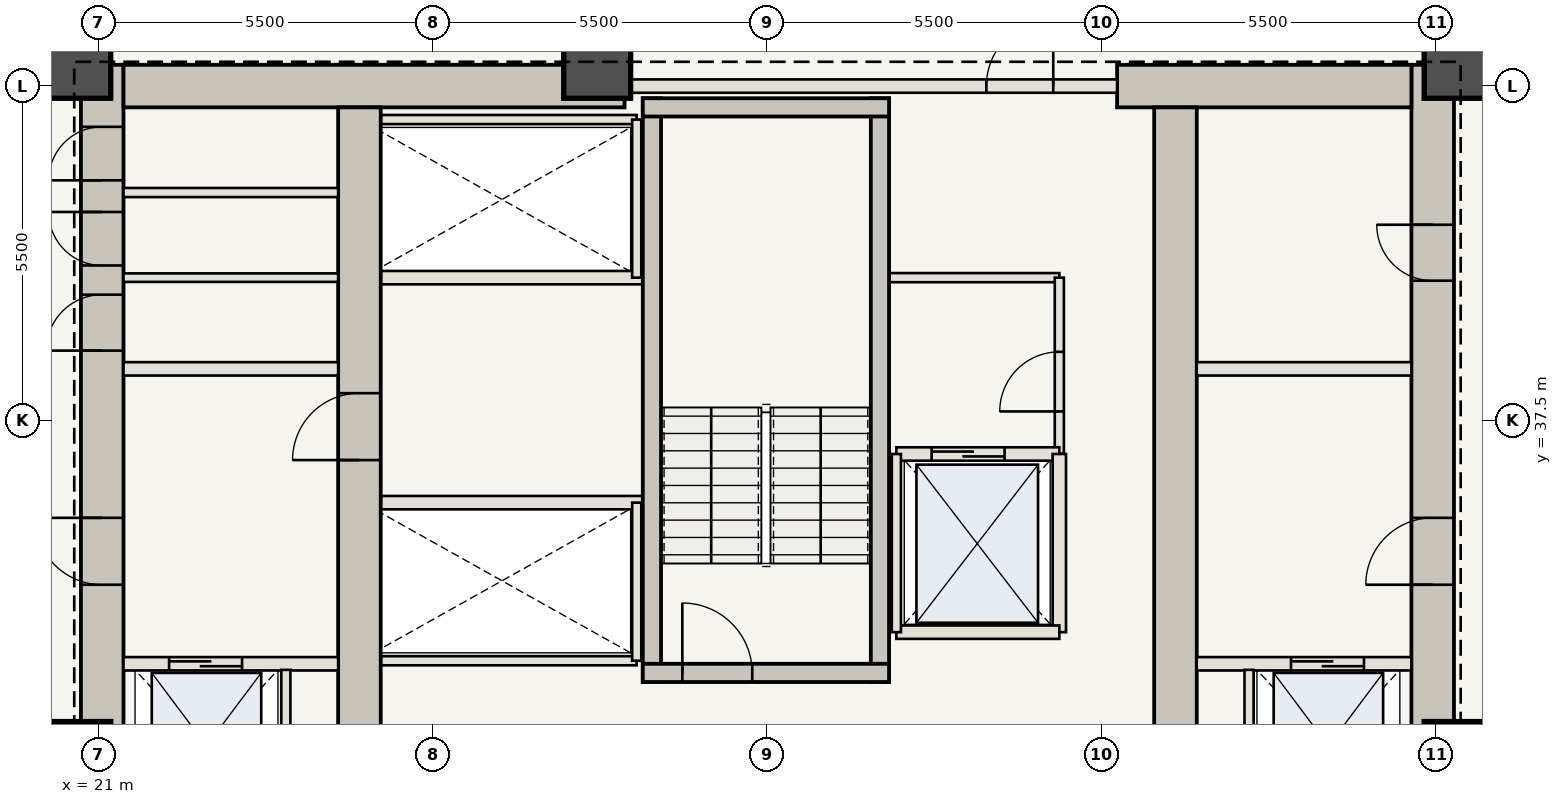
"""IFC4 building model, lengths in metres.
Left out: names, types, materials, properties, quantities, classifications, styles, units other than length and angle.
Written with IfcOpenShell. Run it as: python <this file> out.ifc"""

import sys

from ifc_helpers import new_model, si_unit, direction, frame, frame_2d, origin, origin_2d, place, context, subcontext, project, spatial, rectangle, extrude, element, fill, save


model = new_model("IFC4")
c1 = context("Model", 3, precision=1e-05, world=origin(), true_north=direction((0.0, 1.0)))
c2 = subcontext(c1, "Body", "Model", "MODEL_VIEW")
j1 = project(units=[si_unit("LENGTHUNIT", "METRE"), si_unit("PLANEANGLEUNIT", "RADIAN")], contexts=[c1])
p1 = place(None, origin())
s1 = spatial("IfcSite", under=j1, at=p1, CompositionType="ELEMENT")
p2 = place(p1, origin())
s2 = spatial("IfcBuilding", under=s1, at=p2, CompositionType="ELEMENT")
p3 = place(p2, frame((0.0, 0.0, 92.75)))
s3 = spatial("IfcBuildingStorey", under=s2, at=p3, CompositionType="ELEMENT", Elevation=92.75)
p4 = place(p3, frame((21.06, 30.6, 0.0), z_axis=(0.0, 0.0, 1.0), x_axis=(0.0, 1.0, 0.0)))
e1 = element("IfcWall", 1, at=p4, inside=s3, PredefinedType="SHEAR", context=c2, shape_type="SweptSolid", body=[
    extrude(rectangle(XDim=12.75, YDim=0.7, at=frame_2d((6.375, 0.0))), origin(), (0.0, 0.0, 1.0), 3.5),
])
p5 = place(p4, frame((4.2, 0.0, 0.0)))
e2 = element("IfcOpeningElement", 2, at=p5, cuts=e1, PredefinedType="OPENING", context=c2, shape_type="SweptSolid", body=[
    extrude(rectangle(XDim=1.1, YDim=2.15, at=frame_2d((0.55, 1.075))), frame((0.0, 0.36, 0.0), z_axis=(0.0, -1.0, 0.0), x_axis=(1.0, 0.0, 0.0)), (0.0, 0.0, 1.0), 0.72),
])
p6 = place(p4, frame((8.05, 0.0, 0.0)))
e3 = element("IfcOpeningElement", 3, at=p6, cuts=e1, PredefinedType="OPENING", context=c2, shape_type="SweptSolid", body=[
    extrude(rectangle(XDim=0.92, YDim=2.1, at=frame_2d((0.46, 1.05))), frame((0.0, 0.36, 0.0), z_axis=(0.0, -1.0, 0.0), x_axis=(1.0, 0.0, 0.0)), (0.0, 0.0, 1.0), 0.72),
])
p7 = place(p4, frame((9.45, 0.0, 0.0)))
e4 = element("IfcOpeningElement", 4, at=p7, cuts=e1, PredefinedType="OPENING", context=c2, shape_type="SweptSolid", body=[
    extrude(rectangle(XDim=0.88, YDim=2.1, at=frame_2d((0.44, 1.05))), frame((0.0, 0.36, 0.0), z_axis=(0.0, -1.0, 0.0), x_axis=(1.0, 0.0, 0.0)), (0.0, 0.0, 1.0), 0.72),
])
p8 = place(p4, frame((10.85, 0.0, 0.0)))
e5 = element("IfcOpeningElement", 5, at=p8, cuts=e1, PredefinedType="OPENING", context=c2, shape_type="SweptSolid", body=[
    extrude(rectangle(XDim=0.88, YDim=2.1, at=frame_2d((0.44, 1.05))), frame((0.0, 0.36, 0.0), z_axis=(0.0, -1.0, 0.0), x_axis=(1.0, 0.0, 0.0)), (0.0, 0.0, 1.0), 0.72),
])
p9 = place(p3, frame((42.94, 30.6, 0.0), z_axis=(0.0, 0.0, 1.0), x_axis=(0.0, 1.0, 0.0)))
e6 = element("IfcWall", 6, at=p9, inside=s3, PredefinedType="SHEAR", context=c2, shape_type="SweptSolid", body=[
    extrude(rectangle(XDim=12.75, YDim=0.7, at=frame_2d((6.375, 0.0))), origin(), (0.0, 0.0, 1.0), 3.5),
])
p10 = place(p9, frame((4.2, 0.0, 0.0)))
e7 = element("IfcOpeningElement", 7, at=p10, cuts=e6, PredefinedType="OPENING", context=c2, shape_type="SweptSolid", body=[
    extrude(rectangle(XDim=1.1, YDim=2.15, at=frame_2d((0.55, 1.075))), frame((0.0, 0.36, 0.0), z_axis=(0.0, -1.0, 0.0), x_axis=(1.0, 0.0, 0.0)), (0.0, 0.0, 1.0), 0.72),
])
p11 = place(p9, frame((9.2, 0.0, 0.0)))
e8 = element("IfcOpeningElement", 8, at=p11, cuts=e6, PredefinedType="OPENING", context=c2, shape_type="SweptSolid", body=[
    extrude(rectangle(XDim=0.92, YDim=2.1, at=frame_2d((0.46, 1.05))), frame((0.0, 0.36, 0.0), z_axis=(0.0, -1.0, 0.0), x_axis=(1.0, 0.0, 0.0)), (0.0, 0.0, 1.0), 0.72),
])
p12 = place(p3, frame((21.41, 43.0, 0.0), z_axis=(0.0, 0.0, 1.0), x_axis=(1.0, 0.0, 0.0)))
e9 = element("IfcWall", 9, at=p12, inside=s3, PredefinedType="SHEAR", context=c2, shape_type="SweptSolid", body=[
    extrude(rectangle(XDim=8.24, YDim=0.7, at=frame_2d((4.12, 0.0))), origin(), (0.0, 0.0, 1.0), 3.5),
])
p13 = place(p3, frame((37.75, 43.0, 0.0), z_axis=(0.0, 0.0, 1.0), x_axis=(1.0, 0.0, 0.0)))
e10 = element("IfcWall", 10, at=p13, inside=s3, PredefinedType="SHEAR", context=c2, shape_type="SweptSolid", body=[
    extrude(rectangle(XDim=4.84, YDim=0.7, at=frame_2d((2.42, 0.0))), origin(), (0.0, 0.0, 1.0), 3.5),
])
p14 = place(p3, frame((25.29, 30.6, 0.0), z_axis=(0.0, 0.0, 1.0), x_axis=(0.0, 1.0, 0.0)))
e11 = element("IfcWall", 11, at=p14, inside=s3, PredefinedType="SHEAR", context=c2, shape_type="SweptSolid", body=[
    extrude(rectangle(XDim=12.05, YDim=0.7, at=frame_2d((6.025, 0.0))), origin(), (0.0, 0.0, 1.0), 3.5),
])
p15 = place(p14, frame((6.25, 0.0, 0.0)))
e12 = element("IfcOpeningElement", 12, at=p15, cuts=e11, PredefinedType="OPENING", context=c2, shape_type="SweptSolid", body=[
    extrude(rectangle(XDim=1.1, YDim=2.15, at=frame_2d((0.55, 1.075))), frame((0.0, 0.36, 0.0), z_axis=(0.0, -1.0, 0.0), x_axis=(1.0, 0.0, 0.0)), (0.0, 0.0, 1.0), 0.72),
])
p16 = place(p3, frame((38.71, 30.6, 0.0), z_axis=(0.0, 0.0, 1.0), x_axis=(0.0, 1.0, 0.0)))
e13 = element("IfcWall", 13, at=p16, inside=s3, PredefinedType="SHEAR", context=c2, shape_type="SweptSolid", body=[
    extrude(rectangle(XDim=12.05, YDim=0.7, at=frame_2d((6.025, 0.0))), origin(), (0.0, 0.0, 1.0), 3.5),
])
for number, where, z_axis, x_axis in (
    (14, (43.35, 32.0, 0.0), (0.0, 0.0, 1.0), (1.0, 0.0, 0.0)),
    (15, (43.35, 43.35, 0.0), (0.0, 0.0, 1.0), (1.0, 0.0, 0.0)),
    (16, (29.2, 43.35, 0.0), (0.0, 0.0, 1.0), (1.0, 0.0, 0.0)),
    (17, (20.65, 43.35, 0.0), (0.0, 0.0, 1.0), (1.0, 0.0, 0.0)),
    (18, (20.65, 32.0, 0.0), (0.0, 0.0, 1.0), (1.0, 0.0, 0.0)),
):
    element("IfcColumn", number, at=place(p3, frame(where, z_axis=z_axis, x_axis=x_axis)), inside=s3, PredefinedType="COLUMN", context=c2, shape_type="SweptSolid", body=[
        extrude(rectangle(XDim=1.1, YDim=1.1, at=origin_2d()), origin(), (0.0, 0.0, 1.0), 3.5),
    ])
p17 = place(p3, frame((21.41, 33.5, 0.0), z_axis=(0.0, 0.0, 1.0), x_axis=(1.0, 0.0, 0.0)))
e19 = element("IfcWall", 19, at=p17, inside=s3, PredefinedType="STANDARD", context=c2, shape_type="SweptSolid", body=[
    extrude(rectangle(XDim=3.53, YDim=0.22, at=frame_2d((1.765, 0.0))), origin(), (0.0, 0.0, 1.0), 3.28),
])
p18 = place(p17, frame((0.75, 0.0, 0.0)))
e20 = element("IfcOpeningElement", 20, at=p18, cuts=e19, PredefinedType="OPENING", context=c2, shape_type="SweptSolid", body=[
    extrude(rectangle(XDim=1.2, YDim=2.2, at=frame_2d((0.6, 1.1))), frame((0.0, 0.12, 0.0), z_axis=(0.0, -1.0, 0.0), x_axis=(1.0, 0.0, 0.0)), (0.0, 0.0, 1.0), 0.24),
])
p19 = place(p3, frame((24.08, 30.75, 0.0), z_axis=(0.0, 0.0, 1.0), x_axis=(0.0, 1.0, 0.0)))
e21 = element("IfcWall", 21, at=p19, inside=s3, PredefinedType="STANDARD", context=c2, shape_type="SweptSolid", body=[
    extrude(rectangle(XDim=2.65, YDim=0.15, at=frame_2d((1.325, 0.0))), origin(), (0.0, 0.0, 1.0), 3.28),
])
p20 = place(p3, frame((39.06, 33.5, 0.0), z_axis=(0.0, 0.0, 1.0), x_axis=(1.0, 0.0, 0.0)))
e22 = element("IfcWall", 22, at=p20, inside=s3, PredefinedType="STANDARD", context=c2, shape_type="SweptSolid", body=[
    extrude(rectangle(XDim=3.53, YDim=0.22, at=frame_2d((1.765, 0.0))), origin(), (0.0, 0.0, 1.0), 3.28),
])
p21 = place(p20, frame((1.55, 0.0, 0.0)))
e23 = element("IfcOpeningElement", 23, at=p21, cuts=e22, PredefinedType="OPENING", context=c2, shape_type="SweptSolid", body=[
    extrude(rectangle(XDim=1.2, YDim=2.2, at=frame_2d((0.6, 1.1))), frame((0.0, 0.12, 0.0), z_axis=(0.0, -1.0, 0.0), x_axis=(1.0, 0.0, 0.0)), (0.0, 0.0, 1.0), 0.24),
])
p22 = place(p3, frame((39.92, 30.75, 0.0), z_axis=(0.0, 0.0, 1.0), x_axis=(0.0, 1.0, 0.0)))
e24 = element("IfcWall", 24, at=p22, inside=s3, PredefinedType="STANDARD", context=c2, shape_type="SweptSolid", body=[
    extrude(rectangle(XDim=2.65, YDim=0.15, at=frame_2d((1.325, 0.0))), origin(), (0.0, 0.0, 1.0), 3.28),
])
for number, where, z_axis, x_axis in (
    (25, (21.41, 38.35, 0.0), (0.0, 0.0, 1.0), (1.0, 0.0, 0.0)),
    (26, (39.06, 38.35, 0.0), (0.0, 0.0, 1.0), (1.0, 0.0, 0.0)),
):
    element("IfcWall", number, at=place(p3, frame(where, z_axis=z_axis, x_axis=x_axis)), inside=s3, PredefinedType="STANDARD", context=c2, shape_type="SweptSolid", body=[
        extrude(rectangle(XDim=3.53, YDim=0.22, at=frame_2d((1.765, 0.0))), origin(), (0.0, 0.0, 1.0), 3.28),
    ])
p23 = place(p3, frame((21.41, 39.85, 0.0), z_axis=(0.0, 0.0, 1.0), x_axis=(1.0, 0.0, 0.0)))
e27 = element("IfcWall", 27, at=p23, inside=s3, PredefinedType="STANDARD", context=c2, shape_type="SweptSolid", body=[
    extrude(rectangle(XDim=3.53, YDim=0.14, at=frame_2d((1.765, 0.0))), origin(), (0.0, 0.0, 1.0), 3.28),
])
p24 = place(p3, frame((21.41, 41.25, 0.0), z_axis=(0.0, 0.0, 1.0), x_axis=(1.0, 0.0, 0.0)))
e28 = element("IfcWall", 28, at=p24, inside=s3, PredefinedType="STANDARD", context=c2, shape_type="SweptSolid", body=[
    extrude(rectangle(XDim=3.53, YDim=0.15, at=frame_2d((1.765, 0.0))), origin(), (0.0, 0.0, 1.0), 3.28),
])
p25 = place(p3, frame((34.0, 39.85, 0.0), z_axis=(0.0, 0.0, 1.0), x_axis=(1.0, 0.0, 0.0)))
e29 = element("IfcWall", 29, at=p25, inside=s3, PredefinedType="STANDARD", context=c2, shape_type="SweptSolid", body=[
    extrude(rectangle(XDim=2.8, YDim=0.15, at=frame_2d((1.4, 0.0))), origin(), (0.0, 0.0, 1.0), 3.28),
])
p26 = place(p3, frame((36.8, 36.95, 0.0), z_axis=(0.0, 0.0, 1.0), x_axis=(0.0, 1.0, 0.0)))
e30 = element("IfcWall", 30, at=p26, inside=s3, PredefinedType="STANDARD", context=c2, shape_type="SweptSolid", body=[
    extrude(rectangle(XDim=2.9, YDim=0.15, at=frame_2d((1.45, 0.0))), origin(), (0.0, 0.0, 1.0), 3.28),
])
p27 = place(p26, frame((0.7, 0.0, 0.0)))
e31 = element("IfcOpeningElement", 31, at=p27, cuts=e30, PredefinedType="OPENING", context=c2, shape_type="SweptSolid", body=[
    extrude(rectangle(XDim=0.98, YDim=2.2, at=frame_2d((0.49, 1.1))), frame((0.0, 0.085, 0.0), z_axis=(0.0, -1.0, 0.0), x_axis=(1.0, 0.0, 0.0)), (0.0, 0.0, 1.0), 0.17),
])
p28 = place(p3, frame((25.65, 36.15, 0.0), z_axis=(0.0, 0.0, 1.0), x_axis=(1.0, 0.0, 0.0)))
e32 = element("IfcWall", 32, at=p28, inside=s3, PredefinedType="STANDARD", context=c2, shape_type="SweptSolid", body=[
    extrude(rectangle(XDim=4.3, YDim=0.22, at=frame_2d((2.15, 0.0))), origin(), (0.0, 0.0, 1.0), 3.28),
])
p29 = place(p3, frame((25.65, 33.55, 0.0), z_axis=(0.0, 0.0, 1.0), x_axis=(1.0, 0.0, 0.0)))
e33 = element("IfcWall", 33, at=p29, inside=s3, PredefinedType="STANDARD", context=c2, shape_type="SweptSolid", body=[
    extrude(rectangle(XDim=4.2, YDim=0.15, at=frame_2d((2.1, 0.0))), origin(), (0.0, 0.0, 1.0), 3.28),
])
p30 = place(p3, frame((29.85, 33.55, 0.0), z_axis=(0.0, 0.0, 1.0), x_axis=(0.0, 1.0, 0.0)))
e34 = element("IfcWall", 34, at=p30, inside=s3, PredefinedType="STANDARD", context=c2, shape_type="SweptSolid", body=[
    extrude(rectangle(XDim=2.6, YDim=0.15, at=frame_2d((1.3, 0.0))), origin(), (0.0, 0.0, 1.0), 3.28),
])
p31 = place(p3, frame((25.65, 39.85, 0.0), z_axis=(0.0, 0.0, 1.0), x_axis=(1.0, 0.0, 0.0)))
e35 = element("IfcWall", 35, at=p31, inside=s3, PredefinedType="STANDARD", context=c2, shape_type="SweptSolid", body=[
    extrude(rectangle(XDim=4.3, YDim=0.22, at=frame_2d((2.15, 0.0))), origin(), (0.0, 0.0, 1.0), 3.28),
])
p32 = place(p3, frame((25.65, 42.45, 0.0), z_axis=(0.0, 0.0, 1.0), x_axis=(1.0, 0.0, 0.0)))
e36 = element("IfcWall", 36, at=p32, inside=s3, PredefinedType="STANDARD", context=c2, shape_type="SweptSolid", body=[
    extrude(rectangle(XDim=4.2, YDim=0.15, at=frame_2d((2.1, 0.0))), origin(), (0.0, 0.0, 1.0), 3.28),
])
p33 = place(p3, frame((29.85, 39.85, 0.0), z_axis=(0.0, 0.0, 1.0), x_axis=(0.0, 1.0, 0.0)))
e37 = element("IfcWall", 37, at=p33, inside=s3, PredefinedType="STANDARD", context=c2, shape_type="SweptSolid", body=[
    extrude(rectangle(XDim=2.6, YDim=0.15, at=frame_2d((1.3, 0.0))), origin(), (0.0, 0.0, 1.0), 3.28),
])
for number, where, z_axis, x_axis in (
    (38, (30.1, 33.2, 0.0), (0.0, 0.0, 1.0), (0.0, 1.0, 0.0)),
    (39, (33.85, 33.2, 0.0), (0.0, 0.0, 1.0), (0.0, 1.0, 0.0)),
):
    element("IfcWall", number, at=place(p3, frame(where, z_axis=z_axis, x_axis=x_axis)), inside=s3, PredefinedType="SHEAR", context=c2, shape_type="SweptSolid", body=[
        extrude(rectangle(XDim=9.6, YDim=0.3, at=frame_2d((4.8, 0.0))), origin(), (0.0, 0.0, 1.0), 3.28),
    ])
p34 = place(p3, frame((29.95, 33.35, 0.0), z_axis=(0.0, 0.0, 1.0), x_axis=(1.0, 0.0, 0.0)))
e40 = element("IfcWall", 40, at=p34, inside=s3, PredefinedType="SHEAR", context=c2, shape_type="SweptSolid", body=[
    extrude(rectangle(XDim=4.05, YDim=0.3, at=frame_2d((2.025, 0.0))), origin(), (0.0, 0.0, 1.0), 3.28),
])
p35 = place(p34, frame((0.65, 0.0, 0.0)))
e41 = element("IfcOpeningElement", 41, at=p35, cuts=e40, PredefinedType="OPENING", context=c2, shape_type="SweptSolid", body=[
    extrude(rectangle(XDim=1.15, YDim=2.15, at=frame_2d((0.575, 1.075))), frame((0.0, 0.16, 0.0), z_axis=(0.0, -1.0, 0.0), x_axis=(1.0, 0.0, 0.0)), (0.0, 0.0, 1.0), 0.32),
])
p36 = place(p3, frame((29.95, 42.65, 0.0), z_axis=(0.0, 0.0, 1.0), x_axis=(1.0, 0.0, 0.0)))
e42 = element("IfcWall", 42, at=p36, inside=s3, PredefinedType="SHEAR", context=c2, shape_type="SweptSolid", body=[
    extrude(rectangle(XDim=4.05, YDim=0.3, at=frame_2d((2.025, 0.0))), origin(), (0.0, 0.0, 1.0), 3.28),
])
p37 = place(p3, frame((29.65, 43.0, 0.0), z_axis=(0.0, 0.0, 1.0), x_axis=(1.0, 0.0, 0.0)))
e43 = element("IfcWall", 43, at=p37, inside=s3, PredefinedType="STANDARD", context=c2, shape_type="SweptSolid", body=[
    extrude(rectangle(XDim=8.1, YDim=0.22, at=frame_2d((4.05, 0.0))), origin(), (0.0, 0.0, 1.0), 3.28),
])
p38 = place(p37, frame((5.95, 0.0, 0.0)))
e44 = element("IfcOpeningElement", 44, at=p38, cuts=e43, PredefinedType="OPENING", context=c2, shape_type="SweptSolid", body=[
    extrude(rectangle(XDim=1.1, YDim=2.15, at=frame_2d((0.55, 1.075))), frame((0.0, 0.12, 0.0), z_axis=(0.0, -1.0, 0.0), x_axis=(1.0, 0.0, 0.0)), (0.0, 0.0, 1.0), 0.24),
])
p39 = place(p3, frame((34.12, 36.95, 0.0), z_axis=(0.0, 0.0, 1.0), x_axis=(1.0, 0.0, 0.0)))
e45 = element("IfcWall", 45, at=p39, inside=s3, PredefinedType="STANDARD", context=c2, shape_type="SweptSolid", body=[
    extrude(rectangle(XDim=2.68, YDim=0.22, at=frame_2d((1.34, 0.0))), origin(), (0.0, 0.0, 1.0), 3.28),
])
p40 = place(p39, frame((0.58, 0.0, 0.0)))
e46 = element("IfcOpeningElement", 46, at=p40, cuts=e45, PredefinedType="OPENING", context=c2, shape_type="SweptSolid", body=[
    extrude(rectangle(XDim=1.2, YDim=2.2, at=frame_2d((0.6, 1.1))), frame((0.0, 0.12, 0.0), z_axis=(0.0, -1.0, 0.0), x_axis=(1.0, 0.0, 0.0)), (0.0, 0.0, 1.0), 0.24),
])
p41 = place(p3, frame((36.8, 34.02, 0.0), z_axis=(0.0, 0.0, 1.0), x_axis=(0.0, 1.0, 0.0)))
e47 = element("IfcWall", 47, at=p41, inside=s3, PredefinedType="STANDARD", context=c2, shape_type="SweptSolid", body=[
    extrude(rectangle(XDim=2.93, YDim=0.22, at=frame_2d((1.465, 0.0))), origin(), (0.0, 0.0, 1.0), 3.28),
])
p42 = place(p3, frame((34.12, 34.02, 0.0), z_axis=(0.0, 0.0, 1.0), x_axis=(1.0, 0.0, 0.0)))
e48 = element("IfcWall", 48, at=p42, inside=s3, PredefinedType="STANDARD", context=c2, shape_type="SweptSolid", body=[
    extrude(rectangle(XDim=2.68, YDim=0.22, at=frame_2d((1.34, 0.0))), origin(), (0.0, 0.0, 1.0), 3.28),
])
p43 = place(p3, frame((34.12, 34.02, 0.0), z_axis=(0.0, 0.0, 1.0), x_axis=(0.0, 1.0, 0.0)))
e49 = element("IfcWall", 49, at=p43, inside=s3, PredefinedType="STANDARD", context=c2, shape_type="SweptSolid", body=[
    extrude(rectangle(XDim=2.93, YDim=0.15, at=frame_2d((1.465, 0.0))), origin(), (0.0, 0.0, 1.0), 3.28),
])
p44 = place(p5, origin())
e50 = element("IfcDoor", 50, at=p44, inside=s3, OperationType="SINGLE_SWING_RIGHT", PredefinedType="DOOR", context=c2, shape_type="SweptSolid", body=[
    extrude(rectangle(XDim=1.1, YDim=2.15, at=frame_2d((0.55, 1.075))), frame((0.0, 0.025, 0.0), z_axis=(0.0, -1.0, 0.0), x_axis=(1.0, 0.0, 0.0)), (0.0, 0.0, 1.0), 0.05),
])
fill(e2, e50)
p45 = place(p10, origin())
e51 = element("IfcDoor", 51, at=p45, inside=s3, OperationType="SINGLE_SWING_LEFT", PredefinedType="DOOR", context=c2, shape_type="SweptSolid", body=[
    extrude(rectangle(XDim=1.1, YDim=2.15, at=frame_2d((0.55, 1.075))), frame((0.0, 0.025, 0.0), z_axis=(0.0, -1.0, 0.0), x_axis=(1.0, 0.0, 0.0)), (0.0, 0.0, 1.0), 0.05),
])
fill(e7, e51)
p46 = place(p15, origin())
e52 = element("IfcDoor", 52, at=p46, inside=s3, OperationType="SINGLE_SWING_LEFT", PredefinedType="DOOR", context=c2, shape_type="SweptSolid", body=[
    extrude(rectangle(XDim=1.1, YDim=2.15, at=frame_2d((0.55, 1.075))), frame((0.0, 0.025, 0.0), z_axis=(0.0, -1.0, 0.0), x_axis=(1.0, 0.0, 0.0)), (0.0, 0.0, 1.0), 0.05),
])
fill(e12, e52)
p47 = place(p6, origin())
e53 = element("IfcDoor", 53, at=p47, inside=s3, OperationType="SINGLE_SWING_LEFT", PredefinedType="DOOR", context=c2, shape_type="SweptSolid", body=[
    extrude(rectangle(XDim=0.92, YDim=2.1, at=frame_2d((0.46, 1.05))), frame((0.0, 0.025, 0.0), z_axis=(0.0, -1.0, 0.0), x_axis=(1.0, 0.0, 0.0)), (0.0, 0.0, 1.0), 0.05),
])
fill(e3, e53)
p48 = place(p7, origin())
e54 = element("IfcDoor", 54, at=p48, inside=s3, OperationType="SINGLE_SWING_RIGHT", PredefinedType="DOOR", context=c2, shape_type="SweptSolid", body=[
    extrude(rectangle(XDim=0.88, YDim=2.1, at=frame_2d((0.44, 1.05))), frame((0.0, 0.025, 0.0), z_axis=(0.0, -1.0, 0.0), x_axis=(1.0, 0.0, 0.0)), (0.0, 0.0, 1.0), 0.05),
])
fill(e4, e54)
p49 = place(p8, origin())
e55 = element("IfcDoor", 55, at=p49, inside=s3, OperationType="SINGLE_SWING_LEFT", PredefinedType="DOOR", context=c2, shape_type="SweptSolid", body=[
    extrude(rectangle(XDim=0.88, YDim=2.1, at=frame_2d((0.44, 1.05))), frame((0.0, 0.025, 0.0), z_axis=(0.0, -1.0, 0.0), x_axis=(1.0, 0.0, 0.0)), (0.0, 0.0, 1.0), 0.05),
])
fill(e5, e55)
p50 = place(p11, origin())
e56 = element("IfcDoor", 56, at=p50, inside=s3, OperationType="SINGLE_SWING_RIGHT", PredefinedType="DOOR", context=c2, shape_type="SweptSolid", body=[
    extrude(rectangle(XDim=0.92, YDim=2.1, at=frame_2d((0.46, 1.05))), frame((0.0, 0.025, 0.0), z_axis=(0.0, -1.0, 0.0), x_axis=(1.0, 0.0, 0.0)), (0.0, 0.0, 1.0), 0.05),
])
fill(e8, e56)
p51 = place(p18, origin())
e57 = element("IfcDoor", 57, at=p51, inside=s3, OperationType="DOUBLE_DOOR_SLIDING", PredefinedType="DOOR", context=c2, shape_type="SweptSolid", body=[
    extrude(rectangle(XDim=1.2, YDim=2.2, at=frame_2d((0.6, 1.1))), frame((0.0, 0.025, 0.0), z_axis=(0.0, -1.0, 0.0), x_axis=(1.0, 0.0, 0.0)), (0.0, 0.0, 1.0), 0.05),
])
fill(e20, e57)
p52 = place(p21, origin())
e58 = element("IfcDoor", 58, at=p52, inside=s3, OperationType="DOUBLE_DOOR_SLIDING", PredefinedType="DOOR", context=c2, shape_type="SweptSolid", body=[
    extrude(rectangle(XDim=1.2, YDim=2.2, at=frame_2d((0.6, 1.1))), frame((0.0, 0.025, 0.0), z_axis=(0.0, -1.0, 0.0), x_axis=(1.0, 0.0, 0.0)), (0.0, 0.0, 1.0), 0.05),
])
fill(e23, e58)
p53 = place(p27, origin())
e59 = element("IfcDoor", 59, at=p53, inside=s3, OperationType="SINGLE_SWING_LEFT", PredefinedType="DOOR", context=c2, shape_type="SweptSolid", body=[
    extrude(rectangle(XDim=0.98, YDim=2.2, at=frame_2d((0.49, 1.1))), frame((0.0, 0.025, 0.0), z_axis=(0.0, -1.0, 0.0), x_axis=(1.0, 0.0, 0.0)), (0.0, 0.0, 1.0), 0.05),
])
fill(e31, e59)
p54 = place(p35, origin())
e60 = element("IfcDoor", 60, at=p54, inside=s3, OperationType="SINGLE_SWING_LEFT", PredefinedType="DOOR", context=c2, shape_type="SweptSolid", body=[
    extrude(rectangle(XDim=1.15, YDim=2.15, at=frame_2d((0.575, 1.075))), frame((0.0, 0.025, 0.0), z_axis=(0.0, -1.0, 0.0), x_axis=(1.0, 0.0, 0.0)), (0.0, 0.0, 1.0), 0.05),
])
fill(e41, e60)
p55 = place(p38, origin())
e61 = element("IfcDoor", 61, at=p55, inside=s3, OperationType="SINGLE_SWING_RIGHT", PredefinedType="DOOR", context=c2, shape_type="SweptSolid", body=[
    extrude(rectangle(XDim=1.1, YDim=2.15, at=frame_2d((0.55, 1.075))), frame((0.0, 0.025, 0.0), z_axis=(0.0, -1.0, 0.0), x_axis=(1.0, 0.0, 0.0)), (0.0, 0.0, 1.0), 0.05),
])
fill(e44, e61)
p56 = place(p40, origin())
e62 = element("IfcDoor", 62, at=p56, inside=s3, OperationType="DOUBLE_DOOR_SLIDING", PredefinedType="DOOR", context=c2, shape_type="SweptSolid", body=[
    extrude(rectangle(XDim=1.2, YDim=2.2, at=frame_2d((0.6, 1.1))), frame((0.0, 0.025, 0.0), z_axis=(0.0, -1.0, 0.0), x_axis=(1.0, 0.0, 0.0)), (0.0, 0.0, 1.0), 0.05),
])
fill(e46, e62)
save(model, sys.argv[1])
